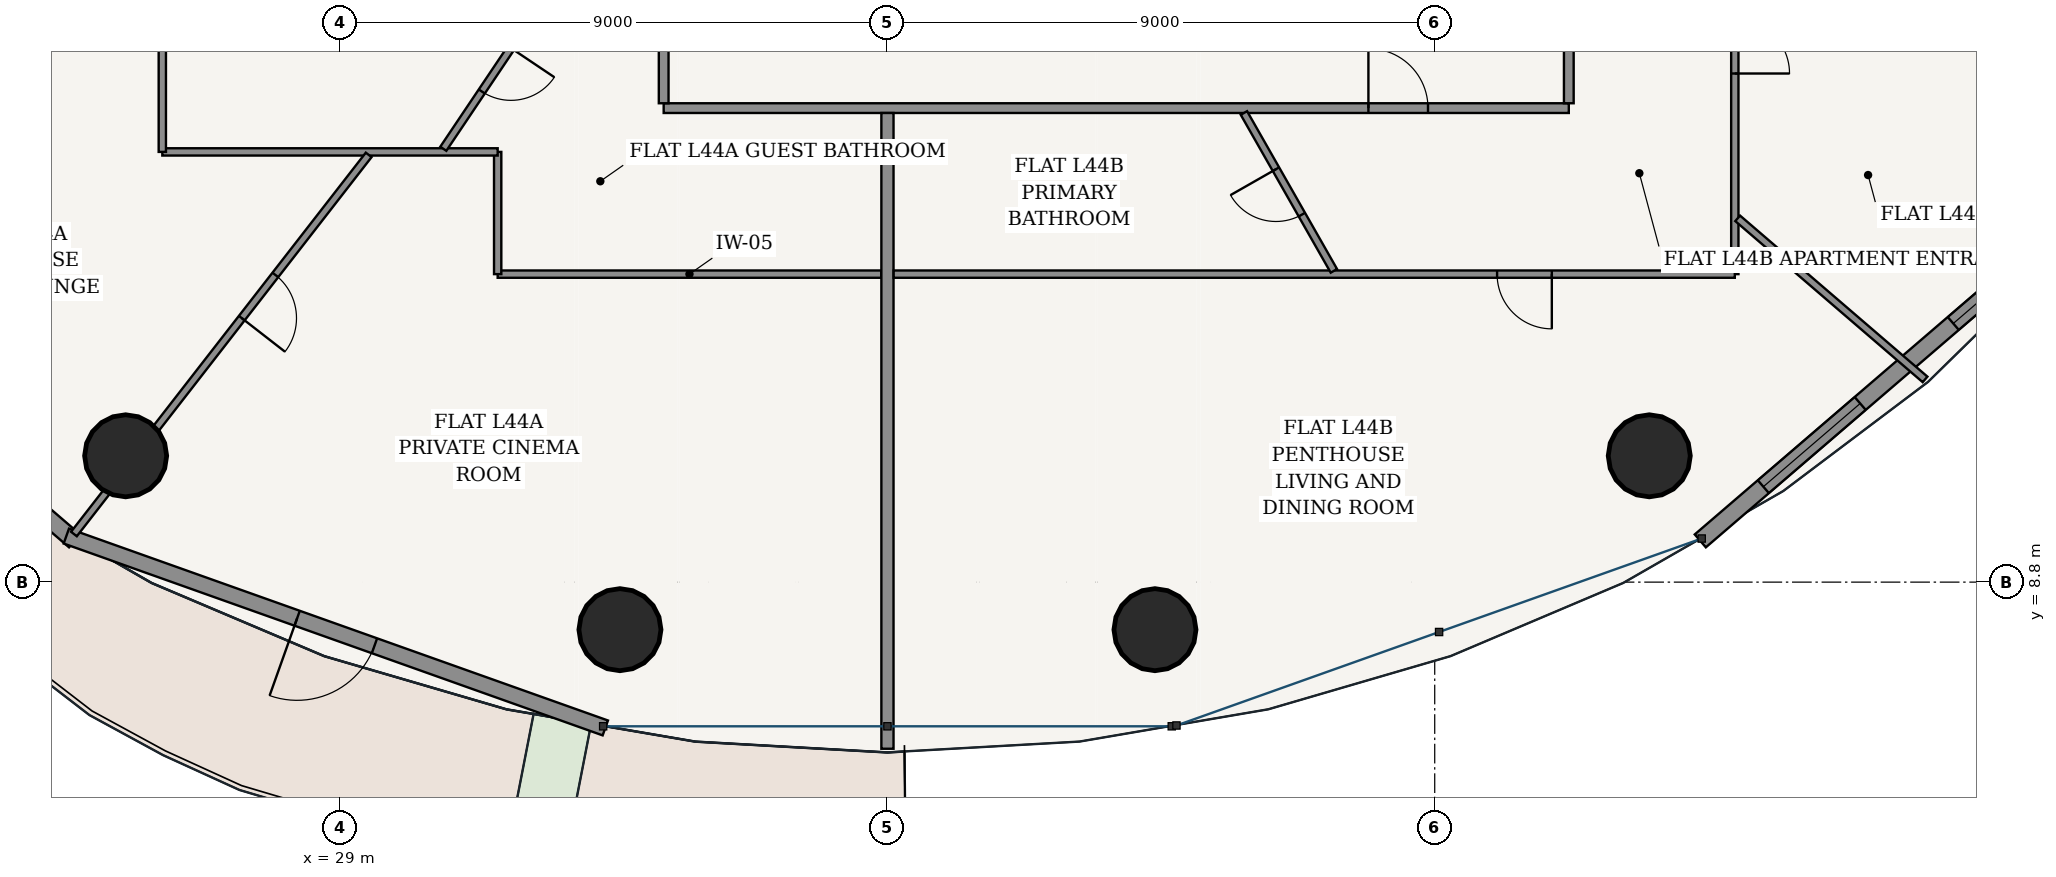
"""IFC4 building model, lengths in metres.
Left out: names, types, materials, properties, quantities, classifications, styles, units other than length and angle.
Written with IfcOpenShell. Run it as: python <this file> out.ifc"""

import sys

from ifc_helpers import new_model, si_unit, direction, frame, frame_2d, origin, origin_2d, place, context, subcontext, project, spatial, rectangle, hollow_circle, extrude, source, transform, mapped, element, fill, save


model = new_model("IFC4")
c1 = context("Model", 3, precision=1e-05, world=origin(), true_north=direction((-0.2419218956, 0.970295726276)))
c2 = subcontext(c1, "Body", "Model", "MODEL_VIEW")
j1 = project(units=[si_unit("LENGTHUNIT", "METRE"), si_unit("PLANEANGLEUNIT", "RADIAN")], contexts=[c1])
p1 = place(None, origin())
s1 = spatial("IfcSite", under=j1, at=p1, CompositionType="ELEMENT")
p2 = place(p1, origin())
s2 = spatial("IfcBuilding", under=s1, at=p2, CompositionType="ELEMENT")
p3 = place(p2, frame((0.0, 0.0, 167.8)))
s3 = spatial("IfcBuildingStorey", under=s2, at=p3, CompositionType="ELEMENT", Elevation=167.8)
for number, where, z_axis, x_axis in (
    (1, (25.472, 10.877, 0.0), (0.0, 0.0, 1.0), (1.0, 0.0, 0.0)),
    (2, (33.601, 8.018, 0.0), (0.0, 0.0, 1.0), (1.0, 0.0, 0.0)),
    (3, (42.399, 8.018, 0.0), (0.0, 0.0, 1.0), (1.0, 0.0, 0.0)),
    (4, (50.528, 10.877, 0.0), (0.0, 0.0, 1.0), (1.0, 0.0, 0.0)),
):
    element("IfcColumn", number, at=place(p3, frame(where, z_axis=z_axis, x_axis=x_axis)), inside=s3, PredefinedType="COLUMN", context=c2, shape_type="SweptSolid", body=[
        extrude(hollow_circle(Radius=0.675, WallThickness=0.042, at=origin_2d()), origin(), (0.0, 0.0, 1.0), 3.6),
    ])
p4 = place(p3, frame((17.843, 15.313, 0.0), z_axis=(0.0, 0.0, 1.0), x_axis=(0.75843401647, -0.651749831348, 0.0)))
e5 = element("IfcWall", 5, at=p4, inside=s3, PredefinedType="SOLIDWALL", context=c2, shape_type="SweptSolid", body=[
    extrude(rectangle(XDim=8.952, YDim=0.28, at=frame_2d((4.476, 0.0))), origin(), (0.0, 0.0, 1.0), 3.33),
])
p5 = place(p4, frame((1.367, 0.0, 0.85)))
e6 = element("IfcOpeningElement", 6, at=p5, cuts=e5, PredefinedType="OPENING", context=c2, shape_type="SweptSolid", body=[
    extrude(rectangle(XDim=2.1, YDim=1.95, at=frame_2d((1.05, 0.975))), frame((0.0, 0.15, 0.0), z_axis=(0.0, -1.0, 0.0), x_axis=(1.0, 0.0, 0.0)), (0.0, 0.0, 1.0), 0.3),
])
p6 = place(p4, frame((5.485, 0.0, 0.85)))
e7 = element("IfcOpeningElement", 7, at=p6, cuts=e5, PredefinedType="OPENING", context=c2, shape_type="SweptSolid", body=[
    extrude(rectangle(XDim=2.1, YDim=1.95, at=frame_2d((1.05, 0.975))), frame((0.0, 0.15, 0.0), z_axis=(0.0, -1.0, 0.0), x_axis=(1.0, 0.0, 0.0)), (0.0, 0.0, 1.0), 0.3),
])
p7 = place(p3, frame((24.497, 9.557, 0.0), z_axis=(0.0, 0.0, 1.0), x_axis=(0.942103604331, -0.335321932934, 0.0)))
e8 = element("IfcWall", 8, at=p7, inside=s3, PredefinedType="SOLIDWALL", context=c2, shape_type="SweptSolid", body=[
    extrude(rectangle(XDim=9.408, YDim=0.26, at=frame_2d((4.704, 0.0))), origin(), (0.0, 0.0, 1.0), 3.33),
])
p8 = place(p7, frame((4.029, 0.0, 0.0)))
e9 = element("IfcOpeningElement", 9, at=p8, cuts=e8, PredefinedType="OPENING", context=c2, shape_type="SweptSolid", body=[
    extrude(rectangle(XDim=1.35, YDim=2.2, at=frame_2d((0.675, 1.1))), frame((0.0, 0.14, 0.0), z_axis=(0.0, -1.0, 0.0), x_axis=(1.0, 0.0, 0.0)), (0.0, 0.0, 1.0), 0.28),
])
p9 = place(p3, frame((51.367, 9.478, 0.0), z_axis=(0.0, 0.0, 1.0), x_axis=(0.75843401647, 0.651749831348, 0.0)))
e10 = element("IfcWall", 10, at=p9, inside=s3, PredefinedType="SOLIDWALL", context=c2, shape_type="SweptSolid", body=[
    extrude(rectangle(XDim=8.952, YDim=0.28, at=frame_2d((4.476, 0.0))), origin(), (0.0, 0.0, 1.0), 3.33),
])
p10 = place(p9, frame((1.367, 0.0, 0.85)))
e11 = element("IfcOpeningElement", 11, at=p10, cuts=e10, PredefinedType="OPENING", context=c2, shape_type="SweptSolid", body=[
    extrude(rectangle(XDim=2.1, YDim=1.95, at=frame_2d((1.05, 0.975))), frame((0.0, 0.15, 0.0), z_axis=(0.0, -1.0, 0.0), x_axis=(1.0, 0.0, 0.0)), (0.0, 0.0, 1.0), 0.3),
])
p11 = place(p9, frame((5.485, 0.0, 0.85)))
e12 = element("IfcOpeningElement", 12, at=p11, cuts=e10, PredefinedType="OPENING", context=c2, shape_type="SweptSolid", body=[
    extrude(rectangle(XDim=2.1, YDim=1.95, at=frame_2d((1.05, 0.975))), frame((0.0, 0.15, 0.0), z_axis=(0.0, -1.0, 0.0), x_axis=(1.0, 0.0, 0.0)), (0.0, 0.0, 1.0), 0.3),
])
p12 = place(p3, frame((34.32, 16.595, 0.0), z_axis=(0.0, 0.0, 1.0), x_axis=(1.0, 0.0, 0.0)))
e13 = element("IfcWall", 13, at=p12, inside=s3, PredefinedType="PARTITIONING", context=c2, shape_type="SweptSolid", body=[
    extrude(rectangle(XDim=14.885, YDim=0.16, at=frame_2d((7.442, 0.0))), origin(), (0.0, 0.0, 1.0), 2.776),
])
p13 = place(p12, frame((11.59, 0.0, 0.0)))
e14 = element("IfcOpeningElement", 14, at=p13, cuts=e13, PredefinedType="OPENING", context=c2, shape_type="SweptSolid", body=[
    extrude(rectangle(XDim=0.98, YDim=2.2, at=frame_2d((0.49, 1.1))), frame((0.0, 0.09, 0.0), z_axis=(0.0, -1.0, 0.0), x_axis=(1.0, 0.0, 0.0)), (0.0, 0.0, 1.0), 0.18),
])
p14 = place(p3, frame((34.32, 16.675, 0.0), z_axis=(0.0, 0.0, 1.0), x_axis=(0.0, 1.0, 0.0)))
e15 = element("IfcWall", 15, at=p14, inside=s3, PredefinedType="PARTITIONING", context=c2, shape_type="SweptSolid", body=[
    extrude(rectangle(XDim=1.85, YDim=0.16, at=frame_2d((0.925, 0.0))), origin(), (0.0, 0.0, 1.0), 3.33),
])
p15 = place(p3, frame((49.205, 16.675, 0.0), z_axis=(0.0, 0.0, 1.0), x_axis=(0.0, 1.0, 0.0)))
e16 = element("IfcWall", 16, at=p15, inside=s3, PredefinedType="PARTITIONING", context=c2, shape_type="SweptSolid", body=[
    extrude(rectangle(XDim=18.4, YDim=0.16, at=frame_2d((9.2, 0.0))), origin(), (0.0, 0.0, 1.0), 2.776),
])
p16 = place(p3, frame((37.898, 13.865, 0.0), z_axis=(0.0, 0.0, 1.0), x_axis=(-1.0, 0.0, 0.0)))
e17 = element("IfcWall", 17, at=p16, inside=s3, PredefinedType="PARTITIONING", context=c2, shape_type="SweptSolid", body=[
    extrude(rectangle(XDim=6.308, YDim=0.12, at=frame_2d((3.154, 0.0))), origin(), (0.0, 0.0, 1.0), 2.776),
])
p17 = place(p3, frame((31.59, 13.865, 0.0), z_axis=(0.0, 0.0, 1.0), x_axis=(0.0, 1.0, 0.0)))
e18 = element("IfcWall", 18, at=p17, inside=s3, PredefinedType="PARTITIONING", context=c2, shape_type="SweptSolid", body=[
    extrude(rectangle(XDim=2.01, YDim=0.12, at=frame_2d((1.005, 0.0))), origin(), (0.0, 0.0, 1.0), 3.005),
])
p18 = place(p3, frame((31.59, 15.875, 0.0), z_axis=(0.0, 0.0, 1.0), x_axis=(-1.0, 0.0, 0.0)))
e19 = element("IfcWall", 19, at=p18, inside=s3, PredefinedType="PARTITIONING", context=c2, shape_type="SweptSolid", body=[
    extrude(rectangle(XDim=5.515, YDim=0.12, at=frame_2d((2.758, 0.0))), origin(), (0.0, 0.0, 1.0), 2.776),
])
p19 = place(p3, frame((26.075, 15.875, 0.0), z_axis=(0.0, 0.0, 1.0), x_axis=(0.0, 1.0, 0.0)))
e20 = element("IfcWall", 20, at=p19, inside=s3, PredefinedType="PARTITIONING", context=c2, shape_type="SweptSolid", body=[
    extrude(rectangle(XDim=5.715, YDim=0.12, at=frame_2d((2.857, 0.0))), origin(), (0.0, 0.0, 1.0), 2.776),
])
p20 = place(p3, frame((26.021, 19.921, 0.0), z_axis=(0.0, 0.0, 1.0), x_axis=(-0.867161148693, -0.498027652041, 0.0)))
e21 = element("IfcWall", 21, at=p20, inside=s3, PredefinedType="PARTITIONING", context=c2, shape_type="SweptSolid", body=[
    extrude(rectangle(XDim=9.279, YDim=0.12, at=frame_2d((4.64, 0.0))), origin(), (0.0, 0.0, 1.0), 2.776),
])
p21 = place(p20, frame((3.192, 0.0, 0.0)))
e22 = element("IfcOpeningElement", 22, at=p21, cuts=e21, PredefinedType="OPENING", context=c2, shape_type="SweptSolid", body=[
    extrude(rectangle(XDim=0.9, YDim=2.15, at=frame_2d((0.45, 1.075))), frame((0.0, 0.07, 0.0), z_axis=(0.0, -1.0, 0.0), x_axis=(1.0, 0.0, 0.0)), (0.0, 0.0, 1.0), 0.14),
])
p22 = place(p3, frame((29.469, 15.826, 0.0), z_axis=(0.0, 0.0, 1.0), x_axis=(-0.61373942367, -0.789508657225, 0.0)))
e23 = element("IfcWall", 23, at=p22, inside=s3, PredefinedType="PARTITIONING", context=c2, shape_type="SweptSolid", body=[
    extrude(rectangle(XDim=7.898, YDim=0.12, at=frame_2d((3.949, 0.0))), origin(), (0.0, 0.0, 1.0), 2.776),
])
p23 = place(p22, frame((2.5, 0.0, 0.0)))
e24 = element("IfcOpeningElement", 24, at=p23, cuts=e23, PredefinedType="OPENING", context=c2, shape_type="SweptSolid", body=[
    extrude(rectangle(XDim=0.9, YDim=2.15, at=frame_2d((0.45, 1.075))), frame((0.0, 0.07, 0.0), z_axis=(0.0, -1.0, 0.0), x_axis=(1.0, 0.0, 0.0)), (0.0, 0.0, 1.0), 0.14),
])
p24 = place(p3, frame((32.441, 18.525, 0.0), z_axis=(0.0, 0.0, 1.0), x_axis=(-0.557594690071, -0.830113342625, 0.0)))
e25 = element("IfcWall", 25, at=p24, inside=s3, PredefinedType="PARTITIONING", context=c2, shape_type="SweptSolid", body=[
    extrude(rectangle(XDim=3.13, YDim=0.12, at=frame_2d((1.565, 0.0))), origin(), (0.0, 0.0, 1.0), 3.33),
])
p25 = place(p24, frame((1.135, 0.0, 0.0)))
e26 = element("IfcOpeningElement", 26, at=p25, cuts=e25, PredefinedType="OPENING", context=c2, shape_type="SweptSolid", body=[
    extrude(rectangle(XDim=0.86, YDim=2.15, at=frame_2d((0.43, 1.075))), frame((0.0, 0.07, 0.0), z_axis=(0.0, -1.0, 0.0), x_axis=(1.0, 0.0, 0.0)), (0.0, 0.0, 1.0), 0.14),
])
p26 = place(p3, frame((38.0, 16.515, 0.0), z_axis=(0.0, 0.0, 1.0), x_axis=(0.0, -1.0, 0.0)))
e27 = element("IfcWall", 27, at=p26, inside=s3, PredefinedType="PARTITIONING", context=c2, shape_type="SweptSolid", body=[
    extrude(rectangle(XDim=10.455, YDim=0.2, at=frame_2d((5.228, 0.0))), origin(), (0.0, 0.0, 1.0), 2.846),
])
p27 = place(p3, frame((51.935, 37.885, 0.0), z_axis=(0.0, 0.0, 1.0), x_axis=(0.0, -1.0, 0.0)))
e28 = element("IfcWall", 28, at=p27, inside=s3, PredefinedType="PARTITIONING", context=c2, shape_type="SweptSolid", body=[
    extrude(rectangle(XDim=24.02, YDim=0.12, at=frame_2d((12.01, 0.0))), origin(), (0.0, 0.0, 1.0), 2.776),
])
p28 = place(p27, frame((19.821, 0.0, 0.0)))
e29 = element("IfcOpeningElement", 29, at=p28, cuts=e28, PredefinedType="OPENING", context=c2, shape_type="SweptSolid", body=[
    extrude(rectangle(XDim=0.9, YDim=2.15, at=frame_2d((0.45, 1.075))), frame((0.0, 0.07, 0.0), z_axis=(0.0, -1.0, 0.0), x_axis=(1.0, 0.0, 0.0)), (0.0, 0.0, 1.0), 0.14),
])
p29 = place(p3, frame((51.935, 13.865, 0.0), z_axis=(0.0, 0.0, 1.0), x_axis=(-1.0, 0.0, 0.0)))
e30 = element("IfcWall", 30, at=p29, inside=s3, PredefinedType="PARTITIONING", context=c2, shape_type="SweptSolid", body=[
    extrude(rectangle(XDim=13.833, YDim=0.12, at=frame_2d((6.917, 0.0))), origin(), (0.0, 0.0, 1.0), 2.776),
])
p30 = place(p29, frame((3.009, 0.0, 0.0)))
e31 = element("IfcOpeningElement", 31, at=p30, cuts=e30, PredefinedType="OPENING", context=c2, shape_type="SweptSolid", body=[
    extrude(rectangle(XDim=0.9, YDim=2.15, at=frame_2d((0.45, 1.075))), frame((0.0, 0.07, 0.0), z_axis=(0.0, -1.0, 0.0), x_axis=(1.0, 0.0, 0.0)), (0.0, 0.0, 1.0), 0.14),
])
p31 = place(p3, frame((51.982, 14.782, 0.0), z_axis=(0.0, 0.0, 1.0), x_axis=(0.758356837469, -0.651839632935, 0.0)))
e32 = element("IfcWall", 32, at=p31, inside=s3, PredefinedType="PARTITIONING", context=c2, shape_type="SweptSolid", body=[
    extrude(rectangle(XDim=4.064, YDim=0.12, at=frame_2d((2.032, 0.0))), origin(), (0.0, 0.0, 1.0), 2.846),
])
p32 = place(p3, frame((43.862, 16.515, 0.0), z_axis=(0.0, 0.0, 1.0), x_axis=(0.495214761056, -0.868770591372, 0.0)))
e33 = element("IfcWall", 33, at=p32, inside=s3, PredefinedType="PARTITIONING", context=c2, shape_type="SweptSolid", body=[
    extrude(rectangle(XDim=2.988, YDim=0.12, at=frame_2d((1.494, 0.0))), origin(), (0.0, 0.0, 1.0), 3.005),
])
p33 = place(p32, frame((1.064, 0.0, 0.0)))
e34 = element("IfcOpeningElement", 34, at=p33, cuts=e33, PredefinedType="OPENING", context=c2, shape_type="SweptSolid", body=[
    extrude(rectangle(XDim=0.86, YDim=2.15, at=frame_2d((0.43, 1.075))), frame((0.0, 0.07, 0.0), z_axis=(0.0, -1.0, 0.0), x_axis=(1.0, 0.0, 0.0)), (0.0, 0.0, 1.0), 0.14),
])
m1 = source(origin(), c2, "Body", "SweptSolid", [
    extrude(rectangle(XDim=1.35, YDim=2.2, at=frame_2d((0.675, 1.1))), frame((0.0, 0.025, 0.0), z_axis=(0.0, -1.0, 0.0), x_axis=(1.0, 0.0, 0.0)), (0.0, 0.0, 1.0), 0.05),
])
p34 = place(p8, frame((1.35, 0.0, 0.0), z_axis=(0.0, 0.0, 1.0), x_axis=(-1.0, 0.0, 0.0)))
e35 = element("IfcDoor", 35, at=p34, inside=s3, OperationType="SINGLE_SWING_RIGHT", PredefinedType="DOOR", context=c2, shape_type="MappedRepresentation", body=[
    mapped(m1, transform((0.0, 0.0, 0.0), scale=1.0)),
])
fill(e9, e35)
m2 = source(origin(), c2, "Body", "SweptSolid", [
    extrude(rectangle(XDim=2.1, YDim=1.95, at=frame_2d((1.05, 0.975))), frame((0.0, 0.03, 0.0), z_axis=(0.0, -1.0, 0.0), x_axis=(1.0, 0.0, 0.0)), (0.0, 0.0, 1.0), 0.06),
])
p35 = place(p10, origin())
e36 = element("IfcWindow", 36, at=p35, inside=s3, PartitioningType="SINGLE_PANEL", PredefinedType="WINDOW", context=c2, shape_type="MappedRepresentation", body=[
    mapped(m2, transform((0.0, 0.0, 0.0), scale=1.0)),
])
fill(e11, e36)
p36 = place(p11, origin())
e37 = element("IfcWindow", 37, at=p36, inside=s3, PartitioningType="SINGLE_PANEL", PredefinedType="WINDOW", context=c2, shape_type="MappedRepresentation", body=[
    mapped(m2, transform((0.0, 0.0, 0.0), scale=1.0)),
])
fill(e12, e37)
m3 = source(origin(), c2, "Body", "SweptSolid", [
    extrude(rectangle(XDim=0.86, YDim=2.15, at=frame_2d((0.43, 1.075))), frame((0.0, 0.025, 0.0), z_axis=(0.0, -1.0, 0.0), x_axis=(1.0, 0.0, 0.0)), (0.0, 0.0, 1.0), 0.05),
])
p37 = place(p25, origin())
e38 = element("IfcDoor", 38, at=p37, inside=s3, OperationType="SINGLE_SWING_LEFT", PredefinedType="DOOR", context=c2, shape_type="MappedRepresentation", body=[
    mapped(m3, transform((0.0, 0.0, 0.0), scale=1.0)),
])
fill(e26, e38)
m4 = source(origin(), c2, "Body", "SweptSolid", [
    extrude(rectangle(XDim=0.9, YDim=2.15, at=frame_2d((0.45, 1.075))), frame((0.0, 0.025, 0.0), z_axis=(0.0, -1.0, 0.0), x_axis=(1.0, 0.0, 0.0)), (0.0, 0.0, 1.0), 0.05),
])
p38 = place(p23, origin())
e39 = element("IfcDoor", 39, at=p38, inside=s3, OperationType="SINGLE_SWING_RIGHT", PredefinedType="DOOR", context=c2, shape_type="MappedRepresentation", body=[
    mapped(m4, transform((0.0, 0.0, 0.0), scale=1.0)),
])
fill(e24, e39)
m5 = source(origin(), c2, "Body", "SweptSolid", [
    extrude(rectangle(XDim=0.98, YDim=2.2, at=frame_2d((0.49, 1.1))), frame((0.0, 0.025, 0.0), z_axis=(0.0, -1.0, 0.0), x_axis=(1.0, 0.0, 0.0)), (0.0, 0.0, 1.0), 0.05),
])
p39 = place(p13, origin())
e40 = element("IfcDoor", 40, at=p39, inside=s3, OperationType="SINGLE_SWING_LEFT", PredefinedType="DOOR", context=c2, shape_type="MappedRepresentation", body=[
    mapped(m5, transform((0.0, 0.0, 0.0), scale=1.0)),
])
fill(e14, e40)
p40 = place(p33, frame((0.86, 0.0, 0.0), z_axis=(0.0, 0.0, 1.0), x_axis=(-1.0, 0.0, 0.0)))
e41 = element("IfcDoor", 41, at=p40, inside=s3, OperationType="SINGLE_SWING_RIGHT", PredefinedType="DOOR", context=c2, shape_type="MappedRepresentation", body=[
    mapped(m3, transform((0.0, 0.0, 0.0), scale=1.0)),
])
fill(e34, e41)
p41 = place(p30, origin())
e42 = element("IfcDoor", 42, at=p41, inside=s3, OperationType="SINGLE_SWING_LEFT", PredefinedType="DOOR", context=c2, shape_type="MappedRepresentation", body=[
    mapped(m4, transform((0.0, 0.0, 0.0), scale=1.0)),
])
fill(e31, e42)
p42 = place(p28, origin())
e43 = element("IfcDoor", 43, at=p42, inside=s3, OperationType="SINGLE_SWING_RIGHT", PredefinedType="DOOR", context=c2, shape_type="MappedRepresentation", body=[
    mapped(m4, transform((0.0, 0.0, 0.0), scale=1.0)),
])
fill(e29, e43)
save(model, sys.argv[1])
